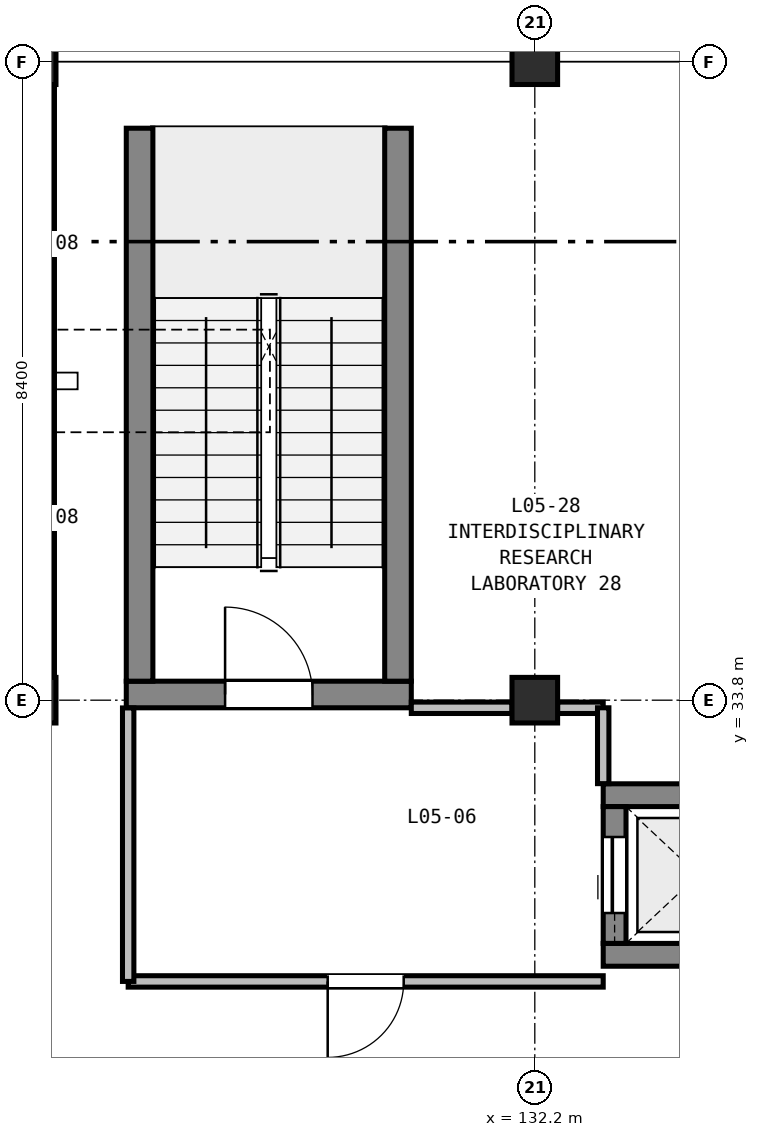
"""IFC4 building model, lengths in metres.
Left out: names, types, materials, properties, quantities, classifications, styles, units other than length and angle.
Written with IfcOpenShell. Run it as: python <this file> out.ifc"""

import sys

from ifc_helpers import new_model, si_unit, direction, frame, frame_2d, origin, origin_2d, place, context, subcontext, project, spatial, rectangle, extrude, element, fill, save


model = new_model("IFC4")
c1 = context("Model", 3, precision=1e-05, world=origin(), true_north=direction((0.0, 1.0)))
c2 = subcontext(c1, "Body", "Model", "MODEL_VIEW")
j1 = project(units=[si_unit("LENGTHUNIT", "METRE"), si_unit("PLANEANGLEUNIT", "RADIAN")], contexts=[c1])
p1 = place(None, origin())
s1 = spatial("IfcSite", under=j1, at=p1, CompositionType="ELEMENT")
p2 = place(p1, origin())
s2 = spatial("IfcBuilding", under=s1, at=p2, CompositionType="ELEMENT")
p3 = place(p2, frame((0.0, 0.0, 24.0)))
s3 = spatial("IfcBuildingStorey", under=s2, at=p3, CompositionType="ELEMENT", Elevation=24.0)
for number, where, z_axis, x_axis in (
    (1, (125.6, 33.8, 0.0), (0.0, 0.0, 1.0), (1.0, 0.0, 0.0)),
    (2, (125.6, 42.2, 0.0), (0.0, 0.0, 1.0), (1.0, 0.0, 0.0)),
    (3, (132.2, 33.8, 0.0), (0.0, 0.0, 1.0), (1.0, 0.0, 0.0)),
    (4, (132.2, 42.2, 0.0), (0.0, 0.0, 1.0), (1.0, 0.0, 0.0)),
):
    element("IfcColumn", number, at=place(p3, frame(where, z_axis=z_axis, x_axis=x_axis)), inside=s3, PredefinedType="COLUMN", context=c2, shape_type="SweptSolid", body=[
        extrude(rectangle(XDim=0.6, YDim=0.6, at=origin_2d()), origin(), (0.0, 0.0, 1.0), 4.5),
    ])
p4 = place(p3, frame((126.825, 33.875, 0.0), z_axis=(0.0, 0.0, 1.0), x_axis=(1.0, 0.0, 0.0)))
e5 = element("IfcWall", 5, at=p4, inside=s3, PredefinedType="SHEAR", context=c2, shape_type="SweptSolid", body=[
    extrude(rectangle(XDim=3.75, YDim=0.35, at=frame_2d((1.875, 0.0))), origin(), (0.0, 0.0, 1.0), 4.5),
])
p5 = place(p4, frame((1.3, 0.0, 0.0)))
e6 = element("IfcOpeningElement", 6, at=p5, cuts=e5, PredefinedType="OPENING", context=c2, shape_type="SweptSolid", body=[
    extrude(rectangle(XDim=1.15, YDim=2.15, at=frame_2d((0.575, 1.075))), frame((0.0, 0.185, 0.0), z_axis=(0.0, -1.0, 0.0), x_axis=(1.0, 0.0, 0.0)), (0.0, 0.0, 1.0), 0.37),
])
p6 = place(p3, frame((126.825, 41.5, 0.0), z_axis=(0.0, 0.0, 1.0), x_axis=(1.0, 0.0, 0.0)))
e7 = element("IfcWall", 7, at=p6, inside=s3, PredefinedType="SHEAR", context=c2, shape_type="SweptSolid", body=[
    extrude(rectangle(XDim=3.75, YDim=0.35, at=frame_2d((1.875, 0.0))), origin(), (0.0, 0.0, 1.0), 4.5),
])
for number, where, z_axis, x_axis in (
    (8, (127.0, 34.05, 0.0), (0.0, 0.0, 1.0), (0.0, 1.0, 0.0)),
    (9, (130.4, 34.05, 0.0), (0.0, 0.0, 1.0), (0.0, 1.0, 0.0)),
):
    element("IfcWall", number, at=place(p3, frame(where, z_axis=z_axis, x_axis=x_axis)), inside=s3, PredefinedType="SHEAR", context=c2, shape_type="SweptSolid", body=[
        extrude(rectangle(XDim=7.275, YDim=0.35, at=frame_2d((3.637, 0.0))), origin(), (0.0, 0.0, 1.0), 4.5),
    ])
for number, where, z_axis, x_axis in (
    (10, (133.1, 30.45, 0.0), (0.0, 0.0, 1.0), (1.0, 0.0, 0.0)),
    (11, (133.1, 32.55, 0.0), (0.0, 0.0, 1.0), (1.0, 0.0, 0.0)),
):
    element("IfcWall", number, at=place(p3, frame(where, z_axis=z_axis, x_axis=x_axis)), inside=s3, PredefinedType="SHEAR", context=c2, shape_type="SweptSolid", body=[
        extrude(rectangle(XDim=2.5, YDim=0.3, at=frame_2d((1.25, 0.0))), origin(), (0.0, 0.0, 1.0), 4.5),
    ])
p7 = place(p3, frame((133.25, 30.6, 0.0), z_axis=(0.0, 0.0, 1.0), x_axis=(0.0, 1.0, 0.0)))
e12 = element("IfcWall", 12, at=p7, inside=s3, PredefinedType="SHEAR", context=c2, shape_type="SweptSolid", body=[
    extrude(rectangle(XDim=1.8, YDim=0.3, at=frame_2d((0.9, 0.0))), origin(), (0.0, 0.0, 1.0), 4.5),
])
p8 = place(p7, frame((0.4, 0.0, 0.0)))
e13 = element("IfcOpeningElement", 13, at=p8, cuts=e12, PredefinedType="OPENING", context=c2, shape_type="SweptSolid", body=[
    extrude(rectangle(XDim=1.0, YDim=2.1, at=frame_2d((0.5, 1.05))), frame((0.0, 0.16, 0.0), z_axis=(0.0, -1.0, 0.0), x_axis=(1.0, 0.0, 0.0)), (0.0, 0.0, 1.0), 0.32),
])
p9 = place(p3, frame((125.74, 34.08, 0.0), z_axis=(0.0, 0.0, 1.0), x_axis=(0.0, 1.0, 0.0)))
e14 = element("IfcWall", 14, at=p9, inside=s3, PredefinedType="STANDARD", context=c2, shape_type="SweptSolid", body=[
    extrude(rectangle(XDim=7.84, YDim=0.28, at=frame_2d((3.92, 0.0))), origin(), (0.0, 0.0, 1.0), 3.735),
])
p10 = place(p9, frame((0.992, 0.0, 0.9)))
e15 = element("IfcOpeningElement", 15, at=p10, cuts=e14, PredefinedType="OPENING", context=c2, shape_type="SweptSolid", body=[
    extrude(rectangle(XDim=2.25, YDim=2.1, at=frame_2d((1.125, 1.05))), frame((0.0, 0.15, 0.0), z_axis=(0.0, -1.0, 0.0), x_axis=(1.0, 0.0, 0.0)), (0.0, 0.0, 1.0), 0.3),
])
p11 = place(p9, frame((4.598, 0.0, 0.9)))
e16 = element("IfcOpeningElement", 16, at=p11, cuts=e14, PredefinedType="OPENING", context=c2, shape_type="SweptSolid", body=[
    extrude(rectangle(XDim=2.25, YDim=2.1, at=frame_2d((1.125, 1.05))), frame((0.0, 0.15, 0.0), z_axis=(0.0, -1.0, 0.0), x_axis=(1.0, 0.0, 0.0)), (0.0, 0.0, 1.0), 0.3),
])
p12 = place(p3, frame((125.6, 42.06, 0.0), z_axis=(0.0, 0.0, 1.0), x_axis=(1.0, 0.0, 0.0)))
e17 = element("IfcWall", 17, at=p12, inside=s3, PredefinedType="STANDARD", context=c2, shape_type="SweptSolid", body=[
    extrude(rectangle(XDim=6.6, YDim=0.28, at=frame_2d((3.3, 0.0))), origin(), (0.0, 0.0, 1.0), 3.735),
])
p13 = place(p3, frame((132.2, 42.06, 0.0), z_axis=(0.0, 0.0, 1.0), x_axis=(1.0, 0.0, 0.0)))
e18 = element("IfcWall", 18, at=p13, inside=s3, PredefinedType="STANDARD", context=c2, shape_type="SweptSolid", body=[
    extrude(rectangle(XDim=3.0, YDim=0.28, at=frame_2d((1.5, 0.0))), origin(), (0.0, 0.0, 1.0), 3.735),
])
p14 = place(p13, frame((1.025, 0.0, 0.9)))
e19 = element("IfcOpeningElement", 19, at=p14, cuts=e18, PredefinedType="OPENING", context=c2, shape_type="SweptSolid", body=[
    extrude(rectangle(XDim=0.95, YDim=1.8, at=frame_2d((0.475, 0.9))), frame((0.0, 0.15, 0.0), z_axis=(0.0, -1.0, 0.0), x_axis=(1.0, 0.0, 0.0)), (0.0, 0.0, 1.0), 0.3),
])
p15 = place(p3, frame((130.575, 33.7, 0.0), z_axis=(0.0, 0.0, 1.0), x_axis=(1.0, 0.0, 0.0)))
e20 = element("IfcWall", 20, at=p15, inside=s3, PredefinedType="PARTITIONING", context=c2, shape_type="SweptSolid", body=[
    extrude(rectangle(XDim=1.325, YDim=0.15, at=frame_2d((0.663, 0.0))), origin(), (0.0, 0.0, 1.0), 3.885),
])
p16 = place(p3, frame((132.5, 33.7, 0.0), z_axis=(0.0, 0.0, 1.0), x_axis=(1.0, 0.0, 0.0)))
e21 = element("IfcWall", 21, at=p16, inside=s3, PredefinedType="PARTITIONING", context=c2, shape_type="SweptSolid", body=[
    extrude(rectangle(XDim=0.6, YDim=0.15, at=frame_2d((0.3, 0.0))), origin(), (0.0, 0.0, 1.0), 3.885),
])
p17 = place(p3, frame((133.1, 33.7, 0.0), z_axis=(0.0, 0.0, 1.0), x_axis=(0.0, -1.0, 0.0)))
e22 = element("IfcWall", 22, at=p17, inside=s3, PredefinedType="PARTITIONING", context=c2, shape_type="SweptSolid", body=[
    extrude(rectangle(XDim=0.998, YDim=0.15, at=frame_2d((0.499, 0.0))), origin(), (0.0, 0.0, 1.0), 3.885),
])
p18 = place(p3, frame((133.1, 30.1, 0.0), z_axis=(0.0, 0.0, 1.0), x_axis=(-1.0, 0.0, 0.0)))
e23 = element("IfcWall", 23, at=p18, inside=s3, PredefinedType="PARTITIONING", context=c2, shape_type="SweptSolid", body=[
    extrude(rectangle(XDim=6.25, YDim=0.15, at=frame_2d((3.125, 0.0))), origin(), (0.0, 0.0, 1.0), 3.735),
])
p19 = place(p18, frame((2.625, 0.0, 0.0)))
e24 = element("IfcOpeningElement", 24, at=p19, cuts=e23, PredefinedType="OPENING", context=c2, shape_type="SweptSolid", body=[
    extrude(rectangle(XDim=1.0, YDim=2.1, at=frame_2d((0.5, 1.05))), frame((0.0, 0.085, 0.0), z_axis=(0.0, -1.0, 0.0), x_axis=(1.0, 0.0, 0.0)), (0.0, 0.0, 1.0), 0.17),
])
p20 = place(p3, frame((126.85, 30.1, 0.0), z_axis=(0.0, 0.0, 1.0), x_axis=(0.0, 1.0, 0.0)))
e25 = element("IfcWall", 25, at=p20, inside=s3, PredefinedType="PARTITIONING", context=c2, shape_type="SweptSolid", body=[
    extrude(rectangle(XDim=3.598, YDim=0.15, at=frame_2d((1.799, 0.0))), origin(), (0.0, 0.0, 1.0), 3.885),
])
p21 = place(p14, origin())
e26 = element("IfcWindow", 26, at=p21, inside=s3, PartitioningType="SINGLE_PANEL", PredefinedType="WINDOW", context=c2, shape_type="SweptSolid", body=[
    extrude(rectangle(XDim=0.95, YDim=1.8, at=frame_2d((0.475, 0.9))), frame((0.0, 0.03, 0.0), z_axis=(0.0, -1.0, 0.0), x_axis=(1.0, 0.0, 0.0)), (0.0, 0.0, 1.0), 0.06),
])
fill(e19, e26)
p22 = place(p5, origin())
e27 = element("IfcDoor", 27, at=p22, inside=s3, OperationType="SINGLE_SWING_LEFT", PredefinedType="DOOR", context=c2, shape_type="SweptSolid", body=[
    extrude(rectangle(XDim=1.15, YDim=2.15, at=frame_2d((0.575, 1.075))), frame((0.0, 0.025, 0.0), z_axis=(0.0, -1.0, 0.0), x_axis=(1.0, 0.0, 0.0)), (0.0, 0.0, 1.0), 0.05),
])
fill(e6, e27)
p23 = place(p8, origin())
e28 = element("IfcDoor", 28, at=p23, inside=s3, OperationType="SLIDING_TO_LEFT", PredefinedType="DOOR", context=c2, shape_type="SweptSolid", body=[
    extrude(rectangle(XDim=1.0, YDim=2.1, at=frame_2d((0.5, 1.05))), frame((0.0, 0.025, 0.0), z_axis=(0.0, -1.0, 0.0), x_axis=(1.0, 0.0, 0.0)), (0.0, 0.0, 1.0), 0.05),
])
fill(e13, e28)
p24 = place(p19, origin())
e29 = element("IfcDoor", 29, at=p24, inside=s3, OperationType="SINGLE_SWING_RIGHT", PredefinedType="DOOR", context=c2, shape_type="SweptSolid", body=[
    extrude(rectangle(XDim=1.0, YDim=2.1, at=frame_2d((0.5, 1.05))), frame((0.0, 0.025, 0.0), z_axis=(0.0, -1.0, 0.0), x_axis=(1.0, 0.0, 0.0)), (0.0, 0.0, 1.0), 0.05),
])
fill(e24, e29)
save(model, sys.argv[1])
